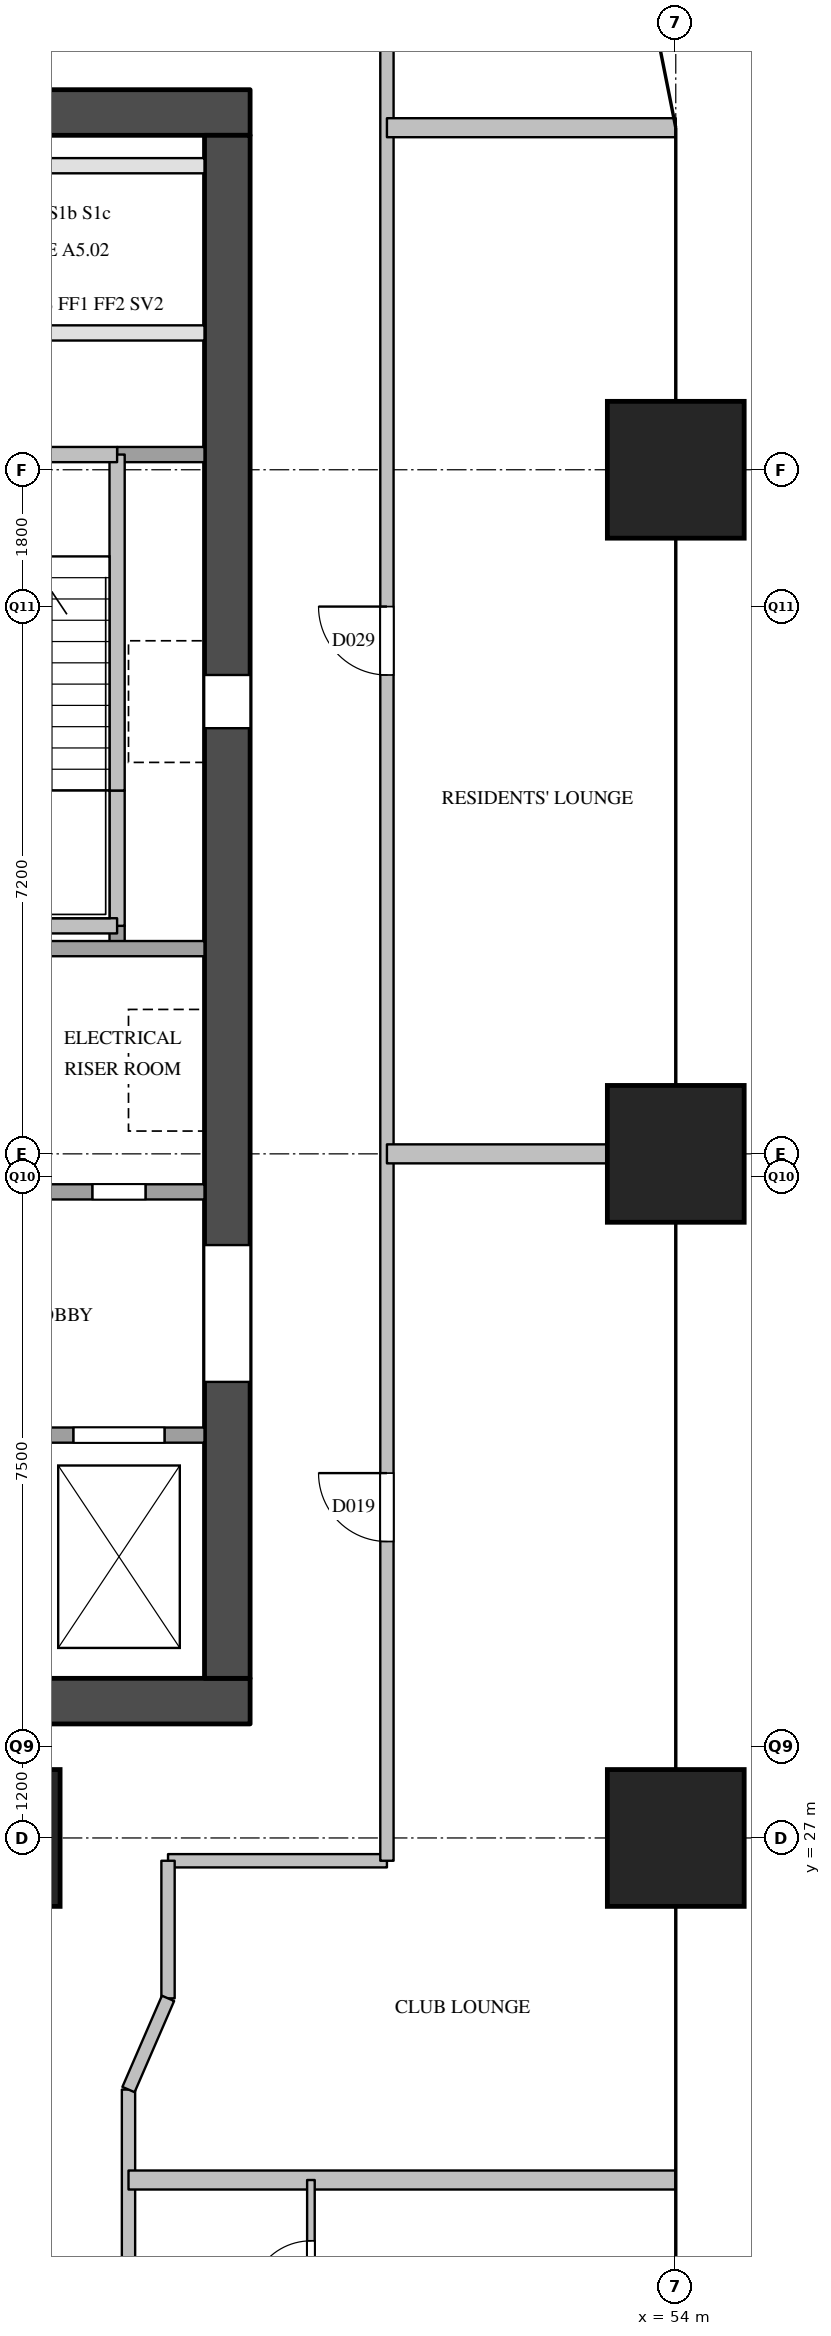
"""IFC4 building model, lengths in metres.
Left out: names, types, materials, properties, quantities, classifications, styles, units other than length and angle.
Written with IfcOpenShell. Run it as: python <this file> out.ifc"""

import sys

from ifc_helpers import new_model, si_unit, direction, frame, frame_2d, origin, origin_2d, place, context, subcontext, project, spatial, rectangle, extrude, element, fill, save


model = new_model("IFC4")
c1 = context("Model", 3, precision=1e-05, world=origin(), true_north=direction((0.0, 1.0)))
c2 = subcontext(c1, "Body", "Model", "MODEL_VIEW")
j1 = project(units=[si_unit("LENGTHUNIT", "METRE"), si_unit("PLANEANGLEUNIT", "RADIAN")], contexts=[c1])
p1 = place(None, origin())
s1 = spatial("IfcSite", under=j1, at=p1, CompositionType="ELEMENT")
p2 = place(p1, origin())
s2 = spatial("IfcBuilding", under=s1, at=p2, CompositionType="ELEMENT")
p3 = place(p2, frame((0.0, 0.0, 104.4)))
s3 = spatial("IfcBuildingStorey", under=s2, at=p3, CompositionType="ELEMENT", Elevation=104.4)
for number, where, z_axis, x_axis in (
    (1, (45.0, 27.0, 0.0), (0.0, 0.0, 1.0), (1.0, 0.0, 0.0)),
    (2, (54.0, 27.0, 0.0), (0.0, 0.0, 1.0), (1.0, 0.0, 0.0)),
    (3, (54.0, 36.0, 0.0), (0.0, 0.0, 1.0), (1.0, 0.0, 0.0)),
    (4, (54.0, 45.0, 0.0), (0.0, 0.0, 1.0), (1.0, 0.0, 0.0)),
):
    element("IfcColumn", number, at=place(p3, frame(where, z_axis=z_axis, x_axis=x_axis)), inside=s3, PredefinedType="COLUMN", context=c2, shape_type="SweptSolid", body=[
        extrude(rectangle(XDim=1.8, YDim=1.8, at=origin_2d()), origin(), (0.0, 0.0, 1.0), 3.8),
    ])
for number, where, z_axis, x_axis in (
    (5, (36.0, 28.8, 0.0), (0.0, 0.0, 1.0), (1.0, 0.0, 0.0)),
    (6, (36.0, 49.7, 0.0), (0.0, 0.0, 1.0), (1.0, 0.0, 0.0)),
):
    element("IfcWall", number, at=place(p3, frame(where, z_axis=z_axis, x_axis=x_axis)), inside=s3, PredefinedType="SHEAR", context=c2, shape_type="SweptSolid", body=[
        extrude(rectangle(XDim=12.4, YDim=0.6, at=frame_2d((6.2, 0.0))), origin(), (0.0, 0.0, 1.0), 3.5),
    ])
p4 = place(p3, frame((48.1, 29.1, 0.0), z_axis=(0.0, 0.0, 1.0), x_axis=(0.0, 1.0, 0.0)))
e7 = element("IfcWall", 7, at=p4, inside=s3, PredefinedType="SHEAR", context=c2, shape_type="SweptSolid", body=[
    extrude(rectangle(XDim=20.3, YDim=0.6, at=frame_2d((10.15, 0.0))), origin(), (0.0, 0.0, 1.0), 3.5),
])
p5 = place(p4, frame((12.5, 0.0, 0.0)))
e8 = element("IfcOpeningElement", 8, at=p5, cuts=e7, PredefinedType="OPENING", context=c2, shape_type="SweptSolid", body=[
    extrude(rectangle(XDim=0.7, YDim=2.1, at=frame_2d((0.35, 1.05))), frame((0.0, 0.31, 0.0), z_axis=(0.0, -1.0, 0.0), x_axis=(1.0, 0.0, 0.0)), (0.0, 0.0, 1.0), 0.62),
])
p6 = place(p4, frame((3.9, 0.0, 0.0)))
e9 = element("IfcOpeningElement", 9, at=p6, cuts=e7, PredefinedType="OPENING", context=c2, shape_type="SweptSolid", body=[
    extrude(rectangle(XDim=1.8, YDim=2.1, at=frame_2d((0.9, 1.05))), frame((0.0, 0.31, 0.0), z_axis=(0.0, -1.0, 0.0), x_axis=(1.0, 0.0, 0.0)), (0.0, 0.0, 1.0), 0.62),
])
p7 = place(p3, frame((46.65, 38.7, 0.0), z_axis=(0.0, 0.0, 1.0), x_axis=(0.0, 1.0, 0.0)))
e10 = element("IfcWall", 10, at=p7, inside=s3, PredefinedType="SOLIDWALL", context=c2, shape_type="SweptSolid", body=[
    extrude(rectangle(XDim=0.3, YDim=0.2, at=frame_2d((0.15, 0.0))), origin(), (0.0, 0.0, 1.0), 3.5),
])
p8 = place(p3, frame((46.65, 39.0, 0.0), z_axis=(0.0, 0.0, 1.0), x_axis=(0.0, 1.0, 0.0)))
e11 = element("IfcWall", 11, at=p8, inside=s3, PredefinedType="SOLIDWALL", context=c2, shape_type="SweptSolid", body=[
    extrude(rectangle(XDim=1.78, YDim=0.2, at=frame_2d((0.89, 0.0))), origin(), (0.0, 0.0, 1.0), 3.5),
])
p9 = place(p3, frame((46.65, 40.78, 0.0), z_axis=(0.0, 0.0, 1.0), x_axis=(0.0, 1.0, 0.0)))
e12 = element("IfcWall", 12, at=p9, inside=s3, PredefinedType="SOLIDWALL", context=c2, shape_type="SweptSolid", body=[
    extrude(rectangle(XDim=4.42, YDim=0.2, at=frame_2d((2.21, 0.0))), origin(), (0.0, 0.0, 1.0), 3.5),
])
p10 = place(p3, frame((36.6, 32.3, 0.0), z_axis=(0.0, 0.0, 1.0), x_axis=(1.0, 0.0, 0.0)))
e13 = element("IfcWall", 13, at=p10, inside=s3, PredefinedType="SOLIDWALL", context=c2, shape_type="SweptSolid", body=[
    extrude(rectangle(XDim=11.2, YDim=0.2, at=frame_2d((5.6, 0.0))), origin(), (0.0, 0.0, 1.0), 3.5),
])
p11 = place(p10, frame((7.225, 0.0, 0.0)))
e14 = element("IfcOpeningElement", 14, at=p11, cuts=e13, PredefinedType="OPENING", context=c2, shape_type="SweptSolid", body=[
    extrude(rectangle(XDim=1.2, YDim=2.1, at=frame_2d((0.6, 1.05))), frame((0.0, 0.11, 0.0), z_axis=(0.0, -1.0, 0.0), x_axis=(1.0, 0.0, 0.0)), (0.0, 0.0, 1.0), 0.22),
])
p12 = place(p10, frame((9.475, 0.0, 0.0)))
e15 = element("IfcOpeningElement", 15, at=p12, cuts=e13, PredefinedType="OPENING", context=c2, shape_type="SweptSolid", body=[
    extrude(rectangle(XDim=1.2, YDim=2.1, at=frame_2d((0.6, 1.05))), frame((0.0, 0.11, 0.0), z_axis=(0.0, -1.0, 0.0), x_axis=(1.0, 0.0, 0.0)), (0.0, 0.0, 1.0), 0.22),
])
p13 = place(p3, frame((43.3, 35.5, 0.0), z_axis=(0.0, 0.0, 1.0), x_axis=(1.0, 0.0, 0.0)))
e16 = element("IfcWall", 16, at=p13, inside=s3, PredefinedType="SOLIDWALL", context=c2, shape_type="SweptSolid", body=[
    extrude(rectangle(XDim=4.5, YDim=0.2, at=frame_2d((2.25, 0.0))), origin(), (0.0, 0.0, 1.0), 3.5),
])
p14 = place(p13, frame((0.525, 0.0, 0.0)))
e17 = element("IfcOpeningElement", 17, at=p14, cuts=e16, PredefinedType="OPENING", context=c2, shape_type="SweptSolid", body=[
    extrude(rectangle(XDim=1.2, YDim=2.1, at=frame_2d((0.6, 1.05))), frame((0.0, 0.11, 0.0), z_axis=(0.0, -1.0, 0.0), x_axis=(1.0, 0.0, 0.0)), (0.0, 0.0, 1.0), 0.22),
])
p15 = place(p13, frame((3.025, 0.0, 0.0)))
e18 = element("IfcOpeningElement", 18, at=p15, cuts=e16, PredefinedType="OPENING", context=c2, shape_type="SweptSolid", body=[
    extrude(rectangle(XDim=0.7, YDim=2.1, at=frame_2d((0.35, 1.05))), frame((0.0, 0.11, 0.0), z_axis=(0.0, -1.0, 0.0), x_axis=(1.0, 0.0, 0.0)), (0.0, 0.0, 1.0), 0.22),
])
p16 = place(p3, frame((43.3, 38.7, 0.0), z_axis=(0.0, 0.0, 1.0), x_axis=(1.0, 0.0, 0.0)))
e19 = element("IfcWall", 19, at=p16, inside=s3, PredefinedType="SOLIDWALL", context=c2, shape_type="SweptSolid", body=[
    extrude(rectangle(XDim=4.5, YDim=0.2, at=frame_2d((2.25, 0.0))), origin(), (0.0, 0.0, 1.0), 3.5),
])
p17 = place(p3, frame((43.4, 39.0, 0.0), z_axis=(0.0, 0.0, 1.0), x_axis=(1.0, 0.0, 0.0)))
e20 = element("IfcWall", 20, at=p17, inside=s3, PredefinedType="SOLIDWALL", context=c2, shape_type="SweptSolid", body=[
    extrude(rectangle(XDim=3.25, YDim=0.2, at=frame_2d((1.625, 0.0))), origin(), (0.0, 0.0, 1.0), 3.5),
])
p18 = place(p3, frame((46.65, 45.2, 0.0), z_axis=(0.0, 0.0, 1.0), x_axis=(1.0, 0.0, 0.0)))
e21 = element("IfcWall", 21, at=p18, inside=s3, PredefinedType="SOLIDWALL", context=c2, shape_type="SweptSolid", body=[
    extrude(rectangle(XDim=1.15, YDim=0.2, at=frame_2d((0.575, 0.0))), origin(), (0.0, 0.0, 1.0), 3.5),
])
p19 = place(p3, frame((36.6, 45.2, 0.0), z_axis=(0.0, 0.0, 1.0), x_axis=(1.0, 0.0, 0.0)))
e22 = element("IfcWall", 22, at=p19, inside=s3, PredefinedType="SOLIDWALL", context=c2, shape_type="SweptSolid", body=[
    extrude(rectangle(XDim=10.05, YDim=0.2, at=frame_2d((5.025, 0.0))), origin(), (0.0, 0.0, 1.0), 3.5),
])
p20 = place(p19, frame((1.125, 0.0, 0.0)))
e23 = element("IfcOpeningElement", 23, at=p20, cuts=e22, PredefinedType="OPENING", context=c2, shape_type="SweptSolid", body=[
    extrude(rectangle(XDim=1.1, YDim=2.1, at=frame_2d((0.55, 1.05))), frame((0.0, 0.11, 0.0), z_axis=(0.0, -1.0, 0.0), x_axis=(1.0, 0.0, 0.0)), (0.0, 0.0, 1.0), 0.22),
])
p21 = place(p19, frame((4.475, 0.0, 0.0)))
e24 = element("IfcOpeningElement", 24, at=p21, cuts=e22, PredefinedType="OPENING", context=c2, shape_type="SweptSolid", body=[
    extrude(rectangle(XDim=1.1, YDim=2.1, at=frame_2d((0.55, 1.05))), frame((0.0, 0.11, 0.0), z_axis=(0.0, -1.0, 0.0), x_axis=(1.0, 0.0, 0.0)), (0.0, 0.0, 1.0), 0.22),
])
p22 = place(p19, frame((7.825, 0.0, 0.0)))
e25 = element("IfcOpeningElement", 25, at=p22, cuts=e22, PredefinedType="OPENING", context=c2, shape_type="SweptSolid", body=[
    extrude(rectangle(XDim=1.1, YDim=2.1, at=frame_2d((0.55, 1.05))), frame((0.0, 0.11, 0.0), z_axis=(0.0, -1.0, 0.0), x_axis=(1.0, 0.0, 0.0)), (0.0, 0.0, 1.0), 0.22),
])
p23 = place(p3, frame((36.6, 46.8, 0.0), z_axis=(0.0, 0.0, 1.0), x_axis=(1.0, 0.0, 0.0)))
e26 = element("IfcWall", 26, at=p23, inside=s3, PredefinedType="PARTITIONING", context=c2, shape_type="SweptSolid", body=[
    extrude(rectangle(XDim=11.2, YDim=0.2, at=frame_2d((5.6, 0.0))), origin(), (0.0, 0.0, 1.0), 3.5),
])
p24 = place(p23, frame((1.23, 0.0, 0.0)))
e27 = element("IfcOpeningElement", 27, at=p24, cuts=e26, PredefinedType="OPENING", context=c2, shape_type="SweptSolid", body=[
    extrude(rectangle(XDim=0.9, YDim=2.1, at=frame_2d((0.45, 1.05))), frame((0.0, 0.11, 0.0), z_axis=(0.0, -1.0, 0.0), x_axis=(1.0, 0.0, 0.0)), (0.0, 0.0, 1.0), 0.22),
])
p25 = place(p23, frame((6.83, 0.0, 0.0)))
e28 = element("IfcOpeningElement", 28, at=p25, cuts=e26, PredefinedType="OPENING", context=c2, shape_type="SweptSolid", body=[
    extrude(rectangle(XDim=0.9, YDim=2.1, at=frame_2d((0.45, 1.05))), frame((0.0, 0.11, 0.0), z_axis=(0.0, -1.0, 0.0), x_axis=(1.0, 0.0, 0.0)), (0.0, 0.0, 1.0), 0.22),
])
p26 = place(p3, frame((36.6, 49.0, 0.0), z_axis=(0.0, 0.0, 1.0), x_axis=(1.0, 0.0, 0.0)))
e29 = element("IfcWall", 29, at=p26, inside=s3, PredefinedType="PARTITIONING", context=c2, shape_type="SweptSolid", body=[
    extrude(rectangle(XDim=11.2, YDim=0.2, at=frame_2d((5.6, 0.0))), origin(), (0.0, 0.0, 1.0), 3.5),
])
p27 = place(p3, frame((47.32, 26.7, 0.0), z_axis=(0.0, 0.0, 1.0), x_axis=(1.0, 0.0, 0.0)))
e30 = element("IfcWall", 30, at=p27, inside=s3, PredefinedType="PARTITIONING", context=c2, shape_type="SweptSolid", body=[
    extrude(rectangle(XDim=2.88, YDim=0.175, at=frame_2d((1.44, 0.0))), origin(), (0.0, 0.0, 1.0), 2.5),
])
p28 = place(p3, frame((46.8, 7.2, 0.0), z_axis=(0.0, 0.0, 1.0), x_axis=(0.0, 1.0, 0.0)))
e31 = element("IfcWall", 31, at=p28, inside=s3, PredefinedType="PARTITIONING", context=c2, shape_type="SweptSolid", body=[
    extrude(rectangle(XDim=16.49, YDim=0.175, at=frame_2d((8.245, 0.0))), origin(), (0.0, 0.0, 1.0), 3.5),
])
p29 = place(p28, frame((0.45, 0.0, 0.0)))
e32 = element("IfcOpeningElement", 32, at=p29, cuts=e31, PredefinedType="OPENING", context=c2, shape_type="SweptSolid", body=[
    extrude(rectangle(XDim=0.9, YDim=2.1, at=frame_2d((0.45, 1.05))), frame((0.0, 0.097, 0.0), z_axis=(0.0, -1.0, 0.0), x_axis=(1.0, 0.0, 0.0)), (0.0, 0.0, 1.0), 0.195),
])
p30 = place(p28, frame((4.6, 0.0, 0.0)))
e33 = element("IfcOpeningElement", 33, at=p30, cuts=e31, PredefinedType="OPENING", context=c2, shape_type="SweptSolid", body=[
    extrude(rectangle(XDim=1.0, YDim=2.1, at=frame_2d((0.5, 1.05))), frame((0.0, 0.097, 0.0), z_axis=(0.0, -1.0, 0.0), x_axis=(1.0, 0.0, 0.0)), (0.0, 0.0, 1.0), 0.195),
])
p31 = place(p28, frame((11.35, 0.0, 0.0)))
e34 = element("IfcOpeningElement", 34, at=p31, cuts=e31, PredefinedType="OPENING", context=c2, shape_type="SweptSolid", body=[
    extrude(rectangle(XDim=1.0, YDim=2.1, at=frame_2d((0.5, 1.05))), frame((0.0, 0.097, 0.0), z_axis=(0.0, -1.0, 0.0), x_axis=(1.0, 0.0, 0.0)), (0.0, 0.0, 1.0), 0.195),
])
p32 = place(p3, frame((47.32, 24.89, 0.0), z_axis=(0.0, 0.0, 1.0), x_axis=(0.0, 1.0, 0.0)))
e35 = element("IfcWall", 35, at=p32, inside=s3, PredefinedType="PARTITIONING", context=c2, shape_type="SweptSolid", body=[
    extrude(rectangle(XDim=1.81, YDim=0.175, at=frame_2d((0.905, 0.0))), origin(), (0.0, 0.0, 1.0), 2.5),
])
p33 = place(p3, frame((50.2, 26.7, 0.0), z_axis=(0.0, 0.0, 1.0), x_axis=(0.0, 1.0, 0.0)))
e36 = element("IfcWall", 36, at=p33, inside=s3, PredefinedType="PARTITIONING", context=c2, shape_type="SweptSolid", body=[
    extrude(rectangle(XDim=25.1, YDim=0.175, at=frame_2d((12.55, 0.0))), origin(), (0.0, 0.0, 1.0), 2.5),
])
p34 = place(p33, frame((4.2, 0.0, 0.0)))
e37 = element("IfcOpeningElement", 37, at=p34, cuts=e36, PredefinedType="OPENING", context=c2, shape_type="SweptSolid", body=[
    extrude(rectangle(XDim=0.9, YDim=2.1, at=frame_2d((0.45, 1.05))), frame((0.0, 0.097, 0.0), z_axis=(0.0, -1.0, 0.0), x_axis=(1.0, 0.0, 0.0)), (0.0, 0.0, 1.0), 0.195),
])
p35 = place(p33, frame((15.6, 0.0, 0.0)))
e38 = element("IfcOpeningElement", 38, at=p35, cuts=e36, PredefinedType="OPENING", context=c2, shape_type="SweptSolid", body=[
    extrude(rectangle(XDim=0.9, YDim=2.1, at=frame_2d((0.45, 1.05))), frame((0.0, 0.097, 0.0), z_axis=(0.0, -1.0, 0.0), x_axis=(1.0, 0.0, 0.0)), (0.0, 0.0, 1.0), 0.195),
])
p36 = place(p3, frame((46.8, 22.5, 0.0), z_axis=(0.0, 0.0, 1.0), x_axis=(1.0, 0.0, 0.0)))
e39 = element("IfcWall", 39, at=p36, inside=s3, PredefinedType="PARTITIONING", context=c2, shape_type="SweptSolid", body=[
    extrude(rectangle(XDim=7.2, YDim=0.25, at=frame_2d((3.6, 0.0))), origin(), (0.0, 0.0, 1.0), 2.5),
])
p37 = place(p3, frame((50.2, 36.0, 0.0), z_axis=(0.0, 0.0, 1.0), x_axis=(1.0, 0.0, 0.0)))
e40 = element("IfcWall", 40, at=p37, inside=s3, PredefinedType="PARTITIONING", context=c2, shape_type="SweptSolid", body=[
    extrude(rectangle(XDim=3.8, YDim=0.25, at=frame_2d((1.9, 0.0))), origin(), (0.0, 0.0, 1.0), 3.5),
])
p38 = place(p3, frame((50.2, 49.5, 0.0), z_axis=(0.0, 0.0, 1.0), x_axis=(1.0, 0.0, 0.0)))
e41 = element("IfcWall", 41, at=p38, inside=s3, PredefinedType="PARTITIONING", context=c2, shape_type="SweptSolid", body=[
    extrude(rectangle(XDim=3.8, YDim=0.25, at=frame_2d((1.9, 0.0))), origin(), (0.0, 0.0, 1.0), 2.5),
])
p39 = place(p3, frame((49.2, 20.1, 0.0), z_axis=(0.0, 0.0, 1.0), x_axis=(0.0, 1.0, 0.0)))
e42 = element("IfcWall", 42, at=p39, inside=s3, PredefinedType="PARTITIONING", context=c2, shape_type="SweptSolid", body=[
    extrude(rectangle(XDim=2.4, YDim=0.1, at=frame_2d((1.2, 0.0))), origin(), (0.0, 0.0, 1.0), 3.5),
])
p40 = place(p39, frame((0.8, 0.0, 0.0)))
e43 = element("IfcOpeningElement", 43, at=p40, cuts=e42, PredefinedType="OPENING", context=c2, shape_type="SweptSolid", body=[
    extrude(rectangle(XDim=0.8, YDim=2.1, at=frame_2d((0.4, 1.05))), frame((0.0, 0.06, 0.0), z_axis=(0.0, -1.0, 0.0), x_axis=(1.0, 0.0, 0.0)), (0.0, 0.0, 1.0), 0.12),
])
p41 = place(p3, frame((47.32, 24.89, 0.0), z_axis=(0.0, 0.0, 1.0), x_axis=(-0.397633632391, -0.917544273804, 0.0)))
e44 = element("IfcWall", 44, at=p41, inside=s3, PredefinedType="PARTITIONING", context=c2, shape_type="SweptSolid", body=[
    extrude(rectangle(XDim=1.308, YDim=0.175, at=frame_2d((0.654, 0.0))), origin(), (0.0, 0.0, 1.0), 3.5),
])
p42 = place(p12, origin())
e45 = element("IfcDoor", 45, at=p42, inside=s3, OperationType="SLIDING_TO_LEFT", PredefinedType="DOOR", context=c2, shape_type="SweptSolid", body=[
    extrude(rectangle(XDim=1.2, YDim=2.1, at=frame_2d((0.6, 1.05))), frame((0.0, 0.025, 0.0), z_axis=(0.0, -1.0, 0.0), x_axis=(1.0, 0.0, 0.0)), (0.0, 0.0, 1.0), 0.05),
])
fill(e15, e45)
p43 = place(p5, origin())
e46 = element("IfcDoor", 46, at=p43, inside=s3, OperationType="SINGLE_SWING_RIGHT", PredefinedType="DOOR", context=c2, shape_type="SweptSolid", body=[
    extrude(rectangle(XDim=0.7, YDim=2.1, at=frame_2d((0.35, 1.05))), frame((0.0, 0.025, 0.0), z_axis=(0.0, -1.0, 0.0), x_axis=(1.0, 0.0, 0.0)), (0.0, 0.0, 1.0), 0.05),
])
fill(e8, e46)
p44 = place(p6, origin())
e47 = element("IfcDoor", 47, at=p44, inside=s3, OperationType="DOUBLE_DOOR_SINGLE_SWING", PredefinedType="DOOR", context=c2, shape_type="SweptSolid", body=[
    extrude(rectangle(XDim=1.8, YDim=2.1, at=frame_2d((0.9, 1.05))), frame((0.0, 0.025, 0.0), z_axis=(0.0, -1.0, 0.0), x_axis=(1.0, 0.0, 0.0)), (0.0, 0.0, 1.0), 0.05),
])
fill(e9, e47)
p45 = place(p15, origin())
e48 = element("IfcDoor", 48, at=p45, inside=s3, OperationType="SINGLE_SWING_RIGHT", PredefinedType="DOOR", context=c2, shape_type="SweptSolid", body=[
    extrude(rectangle(XDim=0.7, YDim=2.1, at=frame_2d((0.35, 1.05))), frame((0.0, 0.025, 0.0), z_axis=(0.0, -1.0, 0.0), x_axis=(1.0, 0.0, 0.0)), (0.0, 0.0, 1.0), 0.05),
])
fill(e18, e48)
p46 = place(p40, origin())
e49 = element("IfcDoor", 49, at=p46, inside=s3, OperationType="SINGLE_SWING_LEFT", PredefinedType="DOOR", context=c2, shape_type="SweptSolid", body=[
    extrude(rectangle(XDim=0.8, YDim=2.1, at=frame_2d((0.4, 1.05))), frame((0.0, 0.025, 0.0), z_axis=(0.0, -1.0, 0.0), x_axis=(1.0, 0.0, 0.0)), (0.0, 0.0, 1.0), 0.05),
])
fill(e43, e49)
p47 = place(p34, origin())
e50 = element("IfcDoor", 50, at=p47, inside=s3, OperationType="SINGLE_SWING_RIGHT", PredefinedType="DOOR", context=c2, shape_type="SweptSolid", body=[
    extrude(rectangle(XDim=0.9, YDim=2.1, at=frame_2d((0.45, 1.05))), frame((0.0, 0.025, 0.0), z_axis=(0.0, -1.0, 0.0), x_axis=(1.0, 0.0, 0.0)), (0.0, 0.0, 1.0), 0.05),
])
fill(e37, e50)
p48 = place(p35, origin())
e51 = element("IfcDoor", 51, at=p48, inside=s3, OperationType="SINGLE_SWING_RIGHT", PredefinedType="DOOR", context=c2, shape_type="SweptSolid", body=[
    extrude(rectangle(XDim=0.9, YDim=2.1, at=frame_2d((0.45, 1.05))), frame((0.0, 0.025, 0.0), z_axis=(0.0, -1.0, 0.0), x_axis=(1.0, 0.0, 0.0)), (0.0, 0.0, 1.0), 0.05),
])
fill(e38, e51)
save(model, sys.argv[1])
